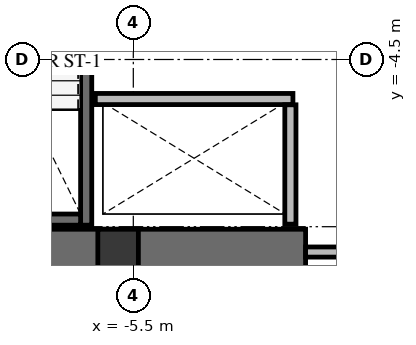
"""IFC4 building model, lengths in metres.
Left out: names, types, materials, properties, quantities, classifications, styles, units other than length and angle.
Written with IfcOpenShell. Run it as: python <this file> out.ifc"""

import sys

from ifc_helpers import new_model, si_unit, direction, frame, frame_2d, origin, origin_2d, place, context, subcontext, project, spatial, rectangle, extrude, source, transform, mapped, element, save


model = new_model("IFC4")
c1 = context("Model", 3, precision=1e-05, world=origin(), true_north=direction((0.0, 1.0)))
c2 = subcontext(c1, "Body", "Model", "MODEL_VIEW")
j1 = project(units=[si_unit("LENGTHUNIT", "METRE"), si_unit("PLANEANGLEUNIT", "RADIAN")], contexts=[c1])
p1 = place(None, origin())
s1 = spatial("IfcSite", under=j1, at=p1, CompositionType="ELEMENT")
p2 = place(p1, origin())
s2 = spatial("IfcBuilding", under=s1, at=p2, CompositionType="ELEMENT")
p3 = place(p2, frame((0.0, 0.0, 5.2)))
s3 = spatial("IfcBuildingStorey", under=s2, at=p3, CompositionType="ELEMENT", Elevation=5.2)
p4 = place(p3, frame((-9.85, -8.3, 0.0), z_axis=(0.0, 0.0, 1.0), x_axis=(1.0, 0.0, 0.0)))
e1 = element("IfcWall", 1, at=p4, inside=s3, PredefinedType="SHEAR", context=c2, shape_type="SweptSolid", body=[
    extrude(rectangle(XDim=7.75, YDim=0.9, at=frame_2d((3.875, 0.0))), origin(), (0.0, 0.0, 1.0), 5.2),
])
p5 = place(p3, frame((-6.43, -7.77, -0.3), z_axis=(0.0, 0.0, 1.0), x_axis=(0.0, 1.0, 0.0)))
e2 = element("IfcWall", 2, at=p5, inside=s3, PredefinedType="SHEAR", context=c2, shape_type="SweptSolid", body=[
    extrude(rectangle(XDim=7.89, YDim=0.22, at=frame_2d((3.945, 0.0))), origin(), (0.0, 0.0, 1.0), 5.15),
])
p6 = place(p5, frame((6.32, 0.0, 0.0)))
e3 = element("IfcOpeningElement", 3, at=p6, cuts=e2, PredefinedType="OPENING", context=c2, shape_type="SweptSolid", body=[
    extrude(rectangle(XDim=1.05, YDim=2.15, at=frame_2d((0.525, 1.075))), frame((0.0, 0.12, 0.0), z_axis=(0.0, -1.0, 0.0), x_axis=(1.0, 0.0, 0.0)), (0.0, 0.0, 1.0), 0.24),
])
p7 = place(p3, frame((-9.5, -7.66, -0.3), z_axis=(0.0, 0.0, 1.0), x_axis=(1.0, 0.0, 0.0)))
e4 = element("IfcWall", 4, at=p7, inside=s3, PredefinedType="SHEAR", context=c2, shape_type="SweptSolid", body=[
    extrude(rectangle(XDim=2.96, YDim=0.22, at=frame_2d((1.48, 0.0))), origin(), (0.0, 0.0, 1.0), 5.15),
])
m1 = source(origin(), c2, "Body", "SweptSolid", [
    extrude(rectangle(XDim=0.8, YDim=0.8, at=origin_2d()), origin(), (0.0, 0.0, 1.0), 5.15),
])
p8 = place(p3, frame((-5.8, -8.25, -0.3), z_axis=(0.0, 0.0, 1.0), x_axis=(1.0, 0.0, 0.0)))
e5 = element("IfcColumn", 5, at=p8, inside=s3, PredefinedType="PILASTER", context=c2, shape_type="MappedRepresentation", body=[
    mapped(m1, transform((0.0, 0.0, 0.0), x_axis=(1.0, 0.0, 0.0), y_axis=(0.0, 1.0, 0.0), z_axis=(0.0, 0.0, 1.0), scale=1.0)),
])
p9 = place(p3, frame((-2.1, -8.3, 0.0), z_axis=(0.0, 0.0, 1.0), x_axis=(1.0, 0.0, 0.0)))
e6 = element("IfcWall", 6, at=p9, inside=s3, PredefinedType="SOLIDWALL", context=c2, shape_type="SweptSolid", body=[
    extrude(rectangle(XDim=4.2, YDim=0.2, at=frame_2d((2.1, 0.0))), origin(), (0.0, 0.0, 1.0), 4.835),
])
p10 = place(p9, frame((1.2, 0.0, 0.0)))
e7 = element("IfcOpeningElement", 7, at=p10, cuts=e6, PredefinedType="OPENING", context=c2, shape_type="SweptSolid", body=[
    extrude(rectangle(XDim=1.8, YDim=2.15, at=frame_2d((0.9, 1.075))), frame((0.0, 0.11, 0.0), z_axis=(0.0, -1.0, 0.0), x_axis=(1.0, 0.0, 0.0)), (0.0, 0.0, 1.0), 0.22),
])
p11 = place(p3, frame((-6.25, -5.28, 0.0), z_axis=(0.0, 0.0, 1.0), x_axis=(1.0, 0.0, 0.0)))
e8 = element("IfcWall", 8, at=p11, inside=s3, PredefinedType="SOLIDWALL", context=c2, shape_type="SweptSolid", body=[
    extrude(rectangle(XDim=3.9, YDim=0.22, at=frame_2d((1.95, 0.0))), origin(), (0.0, 0.0, 1.0), 4.835),
])
p12 = place(p3, frame((-2.4, -7.75, 0.0), z_axis=(0.0, 0.0, 1.0), x_axis=(0.0, 1.0, 0.0)))
e9 = element("IfcWall", 9, at=p12, inside=s3, PredefinedType="SOLIDWALL", context=c2, shape_type="SweptSolid", body=[
    extrude(rectangle(XDim=2.356, YDim=0.22, at=frame_2d((1.178, 0.0))), origin(), (0.0, 0.0, 1.0), 4.835),
])
save(model, sys.argv[1])
